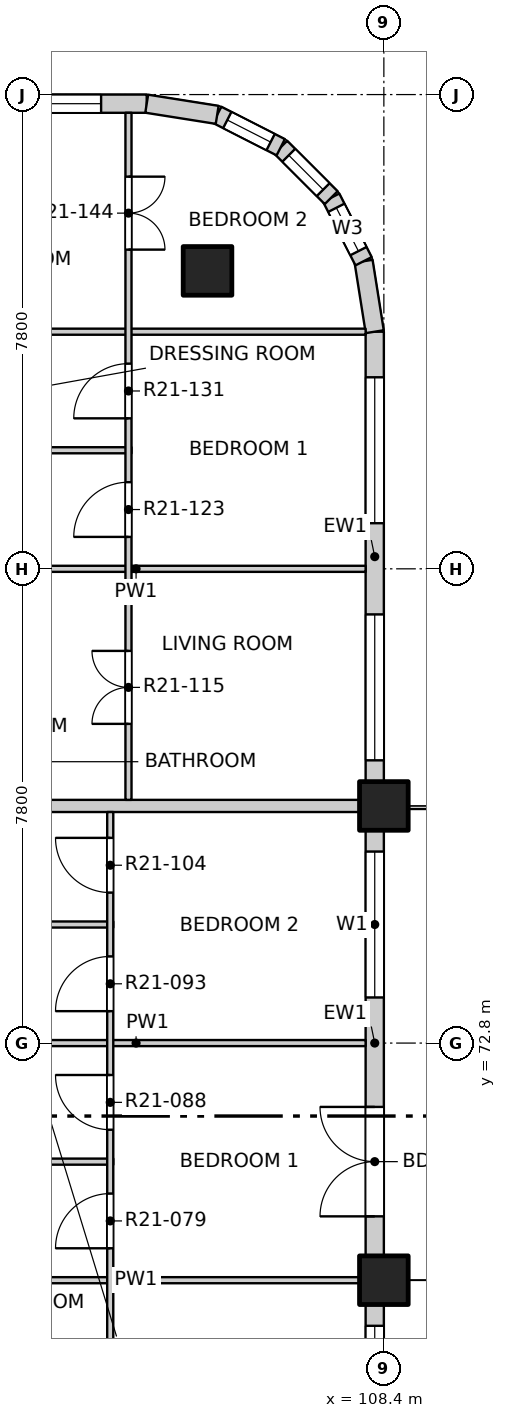
"""IFC4 building model, lengths in metres.
Left out: names, types, materials, properties, quantities, classifications, styles, units other than length and angle.
Written with IfcOpenShell. Run it as: python <this file> out.ifc"""

import sys

from ifc_helpers import new_model, si_unit, direction, frame, frame_2d, origin, origin_2d, place, context, subcontext, project, spatial, rectangle, extrude, element, fill, save


model = new_model("IFC4")
c1 = context("Model", 3, precision=1e-05, world=origin(), true_north=direction((0.0, 1.0)))
c2 = subcontext(c1, "Body", "Model", "MODEL_VIEW")
j1 = project(units=[si_unit("LENGTHUNIT", "METRE"), si_unit("PLANEANGLEUNIT", "RADIAN")], contexts=[c1])
p1 = place(None, origin())
s1 = spatial("IfcSite", under=j1, at=p1, CompositionType="ELEMENT")
p2 = place(p1, origin())
s2 = spatial("IfcBuilding", under=s1, at=p2, CompositionType="ELEMENT")
p3 = place(p2, frame((0.0, 0.0, 221.1)))
s3 = spatial("IfcBuildingStorey", under=s2, at=p3, CompositionType="ELEMENT", Elevation=221.1)
for number, where, z_axis, x_axis in (
    (1, (105.5, 85.5, -0.25), (0.0, 0.0, 1.0), (1.0, 0.0, 0.0)),
    (2, (108.4, 68.9, -0.25), (0.0, 0.0, 1.0), (1.0, 0.0, 0.0)),
    (3, (108.4, 76.7, -0.25), (0.0, 0.0, 1.0), (1.0, 0.0, 0.0)),
):
    element("IfcColumn", number, at=place(p3, frame(where, z_axis=z_axis, x_axis=x_axis)), inside=s3, PredefinedType="COLUMN", context=c2, shape_type="SweptSolid", body=[
        extrude(rectangle(XDim=0.8, YDim=0.8, at=origin_2d()), origin(), (0.0, 0.0, 1.0), 3.4),
    ])
p4 = place(p3, frame((108.25, 61.5, 0.0), z_axis=(0.0, 0.0, 1.0), x_axis=(0.0, 1.0, 0.0)))
e4 = element("IfcWall", 4, at=p4, inside=s3, PredefinedType="SOLIDWALL", context=c2, shape_type="SweptSolid", body=[
    extrude(rectangle(XDim=7.0, YDim=0.3, at=frame_2d((3.5, 0.0))), origin(), (0.0, 0.0, 1.0), 2.7),
])
p5 = place(p4, frame((0.65, 0.0, 0.0)))
e5 = element("IfcOpeningElement", 5, at=p5, cuts=e4, PredefinedType="OPENING", context=c2, shape_type="SweptSolid", body=[
    extrude(rectangle(XDim=1.8, YDim=2.4, at=frame_2d((0.9, 1.2))), frame((0.0, 0.16, 0.0), z_axis=(0.0, -1.0, 0.0), x_axis=(1.0, 0.0, 0.0)), (0.0, 0.0, 1.0), 0.32),
])
p6 = place(p4, frame((4.25, 0.0, 0.9)))
e6 = element("IfcOpeningElement", 6, at=p6, cuts=e4, PredefinedType="OPENING", context=c2, shape_type="SweptSolid", body=[
    extrude(rectangle(XDim=2.4, YDim=1.8, at=frame_2d((1.2, 0.9))), frame((0.0, 0.16, 0.0), z_axis=(0.0, -1.0, 0.0), x_axis=(1.0, 0.0, 0.0)), (0.0, 0.0, 1.0), 0.32),
])
p7 = place(p3, frame((108.25, 69.3, 0.0), z_axis=(0.0, 0.0, 1.0), x_axis=(0.0, 1.0, 0.0)))
e7 = element("IfcWall", 7, at=p7, inside=s3, PredefinedType="SOLIDWALL", context=c2, shape_type="SweptSolid", body=[
    extrude(rectangle(XDim=7.0, YDim=0.3, at=frame_2d((3.5, 0.0))), origin(), (0.0, 0.0, 1.0), 2.7),
])
p8 = place(p7, frame((0.65, 0.0, 0.0)))
e8 = element("IfcOpeningElement", 8, at=p8, cuts=e7, PredefinedType="OPENING", context=c2, shape_type="SweptSolid", body=[
    extrude(rectangle(XDim=1.8, YDim=2.4, at=frame_2d((0.9, 1.2))), frame((0.0, 0.16, 0.0), z_axis=(0.0, -1.0, 0.0), x_axis=(1.0, 0.0, 0.0)), (0.0, 0.0, 1.0), 0.32),
])
p9 = place(p7, frame((4.25, 0.0, 0.9)))
e9 = element("IfcOpeningElement", 9, at=p9, cuts=e7, PredefinedType="OPENING", context=c2, shape_type="SweptSolid", body=[
    extrude(rectangle(XDim=2.4, YDim=1.8, at=frame_2d((1.2, 0.9))), frame((0.0, 0.16, 0.0), z_axis=(0.0, -1.0, 0.0), x_axis=(1.0, 0.0, 0.0)), (0.0, 0.0, 1.0), 0.32),
])
p10 = place(p3, frame((108.25, 77.1, 0.0), z_axis=(0.0, 0.0, 1.0), x_axis=(0.0, 1.0, 0.0)))
e10 = element("IfcWall", 10, at=p10, inside=s3, PredefinedType="SOLIDWALL", context=c2, shape_type="SweptSolid", body=[
    extrude(rectangle(XDim=7.4, YDim=0.3, at=frame_2d((3.7, 0.0))), origin(), (0.0, 0.0, 1.0), 2.7),
])
p11 = place(p10, frame((0.35, 0.0, 0.9)))
e11 = element("IfcOpeningElement", 11, at=p11, cuts=e10, PredefinedType="OPENING", context=c2, shape_type="SweptSolid", body=[
    extrude(rectangle(XDim=2.4, YDim=1.8, at=frame_2d((1.2, 0.9))), frame((0.0, 0.16, 0.0), z_axis=(0.0, -1.0, 0.0), x_axis=(1.0, 0.0, 0.0)), (0.0, 0.0, 1.0), 0.32),
])
p12 = place(p10, frame((4.25, 0.0, 0.9)))
e12 = element("IfcOpeningElement", 12, at=p12, cuts=e10, PredefinedType="OPENING", context=c2, shape_type="SweptSolid", body=[
    extrude(rectangle(XDim=2.4, YDim=1.8, at=frame_2d((1.2, 0.9))), frame((0.0, 0.16, 0.0), z_axis=(0.0, -1.0, 0.0), x_axis=(1.0, 0.0, 0.0)), (0.0, 0.0, 1.0), 0.32),
])
p13 = place(p3, frame((97.1, 88.25, 0.0), z_axis=(0.0, 0.0, 1.0), x_axis=(1.0, 0.0, 0.0)))
e13 = element("IfcWall", 13, at=p13, inside=s3, PredefinedType="SOLIDWALL", context=c2, shape_type="SweptSolid", body=[
    extrude(rectangle(XDim=7.4, YDim=0.3, at=frame_2d((3.7, 0.0))), origin(), (0.0, 0.0, 1.0), 2.7),
])
p14 = place(p13, frame((0.35, 0.0, 0.9)))
e14 = element("IfcOpeningElement", 14, at=p14, cuts=e13, PredefinedType="OPENING", context=c2, shape_type="SweptSolid", body=[
    extrude(rectangle(XDim=2.4, YDim=1.8, at=frame_2d((1.2, 0.9))), frame((0.0, 0.16, 0.0), z_axis=(0.0, -1.0, 0.0), x_axis=(1.0, 0.0, 0.0)), (0.0, 0.0, 1.0), 0.32),
])
p15 = place(p13, frame((4.25, 0.0, 0.9)))
e15 = element("IfcOpeningElement", 15, at=p15, cuts=e13, PredefinedType="OPENING", context=c2, shape_type="SweptSolid", body=[
    extrude(rectangle(XDim=2.4, YDim=1.8, at=frame_2d((1.2, 0.9))), frame((0.0, 0.16, 0.0), z_axis=(0.0, -1.0, 0.0), x_axis=(1.0, 0.0, 0.0)), (0.0, 0.0, 1.0), 0.32),
])
p16 = place(p3, frame((108.25, 84.5, 0.0), z_axis=(0.0, 0.0, 1.0), x_axis=(-0.156496880861, 0.987678452879, 0.0)))
e16 = element("IfcWall", 16, at=p16, inside=s3, PredefinedType="SOLIDWALL", context=c2, shape_type="SweptSolid", body=[
    extrude(rectangle(XDim=1.173, YDim=0.3, at=frame_2d((0.586, 0.0))), origin(), (0.0, 0.0, 1.0), 2.7),
])
p17 = place(p3, frame((108.066, 85.659, 0.0), z_axis=(0.0, 0.0, 1.0), x_axis=(-0.454025524128, 0.890988677504, 0.0)))
e17 = element("IfcWall", 17, at=p17, inside=s3, PredefinedType="SOLIDWALL", context=c2, shape_type="SweptSolid", body=[
    extrude(rectangle(XDim=1.173, YDim=0.3, at=frame_2d((0.587, 0.0))), origin(), (0.0, 0.0, 1.0), 2.7),
])
p18 = place(p17, frame((0.187, 0.0, 0.9)))
e18 = element("IfcOpeningElement", 18, at=p18, cuts=e17, PredefinedType="OPENING", context=c2, shape_type="SweptSolid", body=[
    extrude(rectangle(XDim=0.8, YDim=1.2, at=frame_2d((0.4, 0.6))), frame((0.0, 0.16, 0.0), z_axis=(0.0, -1.0, 0.0), x_axis=(1.0, 0.0, 0.0)), (0.0, 0.0, 1.0), 0.32),
])
p19 = place(p3, frame((107.534, 86.704, 0.0), z_axis=(0.0, 0.0, 1.0), x_axis=(-0.707106781187, 0.707106781187, 0.0)))
e19 = element("IfcWall", 19, at=p19, inside=s3, PredefinedType="SOLIDWALL", context=c2, shape_type="SweptSolid", body=[
    extrude(rectangle(XDim=1.173, YDim=0.3, at=frame_2d((0.586, 0.0))), origin(), (0.0, 0.0, 1.0), 2.7),
])
p20 = place(p19, frame((0.187, 0.0, 0.9)))
e20 = element("IfcOpeningElement", 20, at=p20, cuts=e19, PredefinedType="OPENING", context=c2, shape_type="SweptSolid", body=[
    extrude(rectangle(XDim=0.8, YDim=1.2, at=frame_2d((0.4, 0.6))), frame((0.0, 0.16, 0.0), z_axis=(0.0, -1.0, 0.0), x_axis=(1.0, 0.0, 0.0)), (0.0, 0.0, 1.0), 0.32),
])
p21 = place(p3, frame((106.704, 87.534, 0.0), z_axis=(0.0, 0.0, 1.0), x_axis=(-0.890988677504, 0.454025524128, 0.0)))
e21 = element("IfcWall", 21, at=p21, inside=s3, PredefinedType="SOLIDWALL", context=c2, shape_type="SweptSolid", body=[
    extrude(rectangle(XDim=1.173, YDim=0.3, at=frame_2d((0.587, 0.0))), origin(), (0.0, 0.0, 1.0), 2.7),
])
p22 = place(p21, frame((0.187, 0.0, 0.9)))
e22 = element("IfcOpeningElement", 22, at=p22, cuts=e21, PredefinedType="OPENING", context=c2, shape_type="SweptSolid", body=[
    extrude(rectangle(XDim=0.8, YDim=1.2, at=frame_2d((0.4, 0.6))), frame((0.0, 0.16, 0.0), z_axis=(0.0, -1.0, 0.0), x_axis=(1.0, 0.0, 0.0)), (0.0, 0.0, 1.0), 0.32),
])
p23 = place(p3, frame((105.659, 88.066, 0.0), z_axis=(0.0, 0.0, 1.0), x_axis=(-0.987678452879, 0.156496880861, 0.0)))
e23 = element("IfcWall", 23, at=p23, inside=s3, PredefinedType="SOLIDWALL", context=c2, shape_type="SweptSolid", body=[
    extrude(rectangle(XDim=1.173, YDim=0.3, at=frame_2d((0.586, 0.0))), origin(), (0.0, 0.0, 1.0), 2.7),
])
p24 = place(p3, frame((100.55, 68.9, 0.0), z_axis=(0.0, 0.0, 1.0), x_axis=(1.0, 0.0, 0.0)))
e24 = element("IfcWall", 24, at=p24, inside=s3, PredefinedType="PARTITIONING", context=c2, shape_type="SweptSolid", body=[
    extrude(rectangle(XDim=7.55, YDim=0.1, at=frame_2d((3.775, 0.0))), origin(), (0.0, 0.0, 1.0), 2.55),
])
p25 = place(p3, frame((100.55, 70.85, 0.0), z_axis=(0.0, 0.0, 1.0), x_axis=(1.0, 0.0, 0.0)))
e25 = element("IfcWall", 25, at=p25, inside=s3, PredefinedType="PARTITIONING", context=c2, shape_type="SweptSolid", body=[
    extrude(rectangle(XDim=3.4, YDim=0.1, at=frame_2d((1.7, 0.0))), origin(), (0.0, 0.0, 1.0), 3.15),
])
p26 = place(p3, frame((100.55, 72.8, 0.0), z_axis=(0.0, 0.0, 1.0), x_axis=(1.0, 0.0, 0.0)))
e26 = element("IfcWall", 26, at=p26, inside=s3, PredefinedType="PARTITIONING", context=c2, shape_type="SweptSolid", body=[
    extrude(rectangle(XDim=7.55, YDim=0.1, at=frame_2d((3.775, 0.0))), origin(), (0.0, 0.0, 1.0), 3.15),
])
p27 = place(p3, frame((100.55, 74.75, 0.0), z_axis=(0.0, 0.0, 1.0), x_axis=(1.0, 0.0, 0.0)))
e27 = element("IfcWall", 27, at=p27, inside=s3, PredefinedType="PARTITIONING", context=c2, shape_type="SweptSolid", body=[
    extrude(rectangle(XDim=3.4, YDim=0.1, at=frame_2d((1.7, 0.0))), origin(), (0.0, 0.0, 1.0), 3.15),
])
p28 = place(p3, frame((96.6, 76.7, 0.0), z_axis=(0.0, 0.0, 1.0), x_axis=(1.0, 0.0, 0.0)))
e28 = element("IfcWall", 28, at=p28, inside=s3, PredefinedType="PARTITIONING", context=c2, shape_type="SweptSolid", body=[
    extrude(rectangle(XDim=11.5, YDim=0.2, at=frame_2d((5.75, 0.0))), origin(), (0.0, 0.0, 1.0), 2.55),
])
p29 = place(p3, frame((100.55, 80.6, 0.0), z_axis=(0.0, 0.0, 1.0), x_axis=(1.0, 0.0, 0.0)))
e29 = element("IfcWall", 29, at=p29, inside=s3, PredefinedType="PARTITIONING", context=c2, shape_type="SweptSolid", body=[
    extrude(rectangle(XDim=7.55, YDim=0.1, at=frame_2d((3.775, 0.0))), origin(), (0.0, 0.0, 1.0), 3.15),
])
p30 = place(p3, frame((100.55, 82.55, 0.0), z_axis=(0.0, 0.0, 1.0), x_axis=(1.0, 0.0, 0.0)))
e30 = element("IfcWall", 30, at=p30, inside=s3, PredefinedType="PARTITIONING", context=c2, shape_type="SweptSolid", body=[
    extrude(rectangle(XDim=3.7, YDim=0.1, at=frame_2d((1.85, 0.0))), origin(), (0.0, 0.0, 1.0), 3.15),
])
p31 = place(p3, frame((96.6, 84.5, 0.0), z_axis=(0.0, 0.0, 1.0), x_axis=(1.0, 0.0, 0.0)))
e31 = element("IfcWall", 31, at=p31, inside=s3, PredefinedType="PARTITIONING", context=c2, shape_type="SweptSolid", body=[
    extrude(rectangle(XDim=11.5, YDim=0.1, at=frame_2d((5.75, 0.0))), origin(), (0.0, 0.0, 1.0), 3.15),
])
p32 = place(p31, frame((2.635, 0.0, 0.0)))
e32 = element("IfcOpeningElement", 32, at=p32, cuts=e31, PredefinedType="OPENING", context=c2, shape_type="SweptSolid", body=[
    extrude(rectangle(XDim=0.9, YDim=2.1, at=frame_2d((0.45, 1.05))), frame((0.0, 0.06, 0.0), z_axis=(0.0, -1.0, 0.0), x_axis=(1.0, 0.0, 0.0)), (0.0, 0.0, 1.0), 0.12),
])
p33 = place(p3, frame((103.9, 65.1, 0.0), z_axis=(0.0, 0.0, 1.0), x_axis=(0.0, 1.0, 0.0)))
e33 = element("IfcWall", 33, at=p33, inside=s3, PredefinedType="PARTITIONING", context=c2, shape_type="SweptSolid", body=[
    extrude(rectangle(XDim=11.5, YDim=0.1, at=frame_2d((5.75, 0.0))), origin(), (0.0, 0.0, 1.0), 3.15),
])
p34 = place(p33, frame((1.25, 0.0, 0.0)))
e34 = element("IfcOpeningElement", 34, at=p34, cuts=e33, PredefinedType="OPENING", context=c2, shape_type="SweptSolid", body=[
    extrude(rectangle(XDim=1.2, YDim=2.1, at=frame_2d((0.6, 1.05))), frame((0.0, 0.06, 0.0), z_axis=(0.0, -1.0, 0.0), x_axis=(1.0, 0.0, 0.0)), (0.0, 0.0, 1.0), 0.12),
])
p35 = place(p33, frame((4.325, 0.0, 0.0)))
e35 = element("IfcOpeningElement", 35, at=p35, cuts=e33, PredefinedType="OPENING", context=c2, shape_type="SweptSolid", body=[
    extrude(rectangle(XDim=0.9, YDim=2.1, at=frame_2d((0.45, 1.05))), frame((0.0, 0.06, 0.0), z_axis=(0.0, -1.0, 0.0), x_axis=(1.0, 0.0, 0.0)), (0.0, 0.0, 1.0), 0.12),
])
p36 = place(p33, frame((6.275, 0.0, 0.0)))
e36 = element("IfcOpeningElement", 36, at=p36, cuts=e33, PredefinedType="OPENING", context=c2, shape_type="SweptSolid", body=[
    extrude(rectangle(XDim=0.9, YDim=2.1, at=frame_2d((0.45, 1.05))), frame((0.0, 0.06, 0.0), z_axis=(0.0, -1.0, 0.0), x_axis=(1.0, 0.0, 0.0)), (0.0, 0.0, 1.0), 0.12),
])
p37 = place(p33, frame((8.225, 0.0, 0.0)))
e37 = element("IfcOpeningElement", 37, at=p37, cuts=e33, PredefinedType="OPENING", context=c2, shape_type="SweptSolid", body=[
    extrude(rectangle(XDim=0.9, YDim=2.1, at=frame_2d((0.45, 1.05))), frame((0.0, 0.06, 0.0), z_axis=(0.0, -1.0, 0.0), x_axis=(1.0, 0.0, 0.0)), (0.0, 0.0, 1.0), 0.12),
])
p38 = place(p33, frame((10.175, 0.0, 0.0)))
e38 = element("IfcOpeningElement", 38, at=p38, cuts=e33, PredefinedType="OPENING", context=c2, shape_type="SweptSolid", body=[
    extrude(rectangle(XDim=0.9, YDim=2.1, at=frame_2d((0.45, 1.05))), frame((0.0, 0.06, 0.0), z_axis=(0.0, -1.0, 0.0), x_axis=(1.0, 0.0, 0.0)), (0.0, 0.0, 1.0), 0.12),
])
p39 = place(p3, frame((104.2, 76.8, 0.0), z_axis=(0.0, 0.0, 1.0), x_axis=(0.0, 1.0, 0.0)))
e39 = element("IfcWall", 39, at=p39, inside=s3, PredefinedType="PARTITIONING", context=c2, shape_type="SweptSolid", body=[
    extrude(rectangle(XDim=11.3, YDim=0.1, at=frame_2d((5.65, 0.0))), origin(), (0.0, 0.0, 1.0), 3.15),
])
p40 = place(p39, frame((1.25, 0.0, 0.0)))
e40 = element("IfcOpeningElement", 40, at=p40, cuts=e39, PredefinedType="OPENING", context=c2, shape_type="SweptSolid", body=[
    extrude(rectangle(XDim=1.2, YDim=2.1, at=frame_2d((0.6, 1.05))), frame((0.0, 0.06, 0.0), z_axis=(0.0, -1.0, 0.0), x_axis=(1.0, 0.0, 0.0)), (0.0, 0.0, 1.0), 0.12),
])
p41 = place(p39, frame((4.325, 0.0, 0.0)))
e41 = element("IfcOpeningElement", 41, at=p41, cuts=e39, PredefinedType="OPENING", context=c2, shape_type="SweptSolid", body=[
    extrude(rectangle(XDim=0.9, YDim=2.1, at=frame_2d((0.45, 1.05))), frame((0.0, 0.06, 0.0), z_axis=(0.0, -1.0, 0.0), x_axis=(1.0, 0.0, 0.0)), (0.0, 0.0, 1.0), 0.12),
])
p42 = place(p39, frame((6.275, 0.0, 0.0)))
e42 = element("IfcOpeningElement", 42, at=p42, cuts=e39, PredefinedType="OPENING", context=c2, shape_type="SweptSolid", body=[
    extrude(rectangle(XDim=0.9, YDim=2.1, at=frame_2d((0.45, 1.05))), frame((0.0, 0.06, 0.0), z_axis=(0.0, -1.0, 0.0), x_axis=(1.0, 0.0, 0.0)), (0.0, 0.0, 1.0), 0.12),
])
p43 = place(p39, frame((9.05, 0.0, 0.0)))
e43 = element("IfcOpeningElement", 43, at=p43, cuts=e39, PredefinedType="OPENING", context=c2, shape_type="SweptSolid", body=[
    extrude(rectangle(XDim=1.2, YDim=2.1, at=frame_2d((0.6, 1.05))), frame((0.0, 0.06, 0.0), z_axis=(0.0, -1.0, 0.0), x_axis=(1.0, 0.0, 0.0)), (0.0, 0.0, 1.0), 0.12),
])
p44 = place(p6, origin())
e44 = element("IfcWindow", 44, at=p44, inside=s3, PartitioningType="DOUBLE_PANEL_VERTICAL", PredefinedType="WINDOW", context=c2, shape_type="SweptSolid", body=[
    extrude(rectangle(XDim=2.4, YDim=1.8, at=frame_2d((1.2, 0.9))), frame((0.0, 0.03, 0.0), z_axis=(0.0, -1.0, 0.0), x_axis=(1.0, 0.0, 0.0)), (0.0, 0.0, 1.0), 0.06),
])
fill(e6, e44)
p45 = place(p8, origin())
e45 = element("IfcDoor", 45, at=p45, inside=s3, OperationType="DOUBLE_DOOR_SINGLE_SWING", PredefinedType="DOOR", context=c2, shape_type="SweptSolid", body=[
    extrude(rectangle(XDim=1.8, YDim=2.4, at=frame_2d((0.9, 1.2))), frame((0.0, 0.025, 0.0), z_axis=(0.0, -1.0, 0.0), x_axis=(1.0, 0.0, 0.0)), (0.0, 0.0, 1.0), 0.05),
])
fill(e8, e45)
p46 = place(p9, origin())
e46 = element("IfcWindow", 46, at=p46, inside=s3, PartitioningType="DOUBLE_PANEL_VERTICAL", PredefinedType="WINDOW", context=c2, shape_type="SweptSolid", body=[
    extrude(rectangle(XDim=2.4, YDim=1.8, at=frame_2d((1.2, 0.9))), frame((0.0, 0.03, 0.0), z_axis=(0.0, -1.0, 0.0), x_axis=(1.0, 0.0, 0.0)), (0.0, 0.0, 1.0), 0.06),
])
fill(e9, e46)
p47 = place(p11, origin())
e47 = element("IfcWindow", 47, at=p47, inside=s3, PartitioningType="DOUBLE_PANEL_VERTICAL", PredefinedType="WINDOW", context=c2, shape_type="SweptSolid", body=[
    extrude(rectangle(XDim=2.4, YDim=1.8, at=frame_2d((1.2, 0.9))), frame((0.0, 0.03, 0.0), z_axis=(0.0, -1.0, 0.0), x_axis=(1.0, 0.0, 0.0)), (0.0, 0.0, 1.0), 0.06),
])
fill(e11, e47)
p48 = place(p12, origin())
e48 = element("IfcWindow", 48, at=p48, inside=s3, PartitioningType="DOUBLE_PANEL_VERTICAL", PredefinedType="WINDOW", context=c2, shape_type="SweptSolid", body=[
    extrude(rectangle(XDim=2.4, YDim=1.8, at=frame_2d((1.2, 0.9))), frame((0.0, 0.03, 0.0), z_axis=(0.0, -1.0, 0.0), x_axis=(1.0, 0.0, 0.0)), (0.0, 0.0, 1.0), 0.06),
])
fill(e12, e48)
p49 = place(p15, origin())
e49 = element("IfcWindow", 49, at=p49, inside=s3, PartitioningType="DOUBLE_PANEL_VERTICAL", PredefinedType="WINDOW", context=c2, shape_type="SweptSolid", body=[
    extrude(rectangle(XDim=2.4, YDim=1.8, at=frame_2d((1.2, 0.9))), frame((0.0, 0.03, 0.0), z_axis=(0.0, -1.0, 0.0), x_axis=(1.0, 0.0, 0.0)), (0.0, 0.0, 1.0), 0.06),
])
fill(e15, e49)
p50 = place(p18, origin())
e50 = element("IfcWindow", 50, at=p50, inside=s3, PartitioningType="SINGLE_PANEL", PredefinedType="WINDOW", context=c2, shape_type="SweptSolid", body=[
    extrude(rectangle(XDim=0.8, YDim=1.2, at=frame_2d((0.4, 0.6))), frame((0.0, 0.03, 0.0), z_axis=(0.0, -1.0, 0.0), x_axis=(1.0, 0.0, 0.0)), (0.0, 0.0, 1.0), 0.06),
])
fill(e18, e50)
p51 = place(p20, origin())
e51 = element("IfcWindow", 51, at=p51, inside=s3, PartitioningType="SINGLE_PANEL", PredefinedType="WINDOW", context=c2, shape_type="SweptSolid", body=[
    extrude(rectangle(XDim=0.8, YDim=1.2, at=frame_2d((0.4, 0.6))), frame((0.0, 0.03, 0.0), z_axis=(0.0, -1.0, 0.0), x_axis=(1.0, 0.0, 0.0)), (0.0, 0.0, 1.0), 0.06),
])
fill(e20, e51)
p52 = place(p22, origin())
e52 = element("IfcWindow", 52, at=p52, inside=s3, PartitioningType="SINGLE_PANEL", PredefinedType="WINDOW", context=c2, shape_type="SweptSolid", body=[
    extrude(rectangle(XDim=0.8, YDim=1.2, at=frame_2d((0.4, 0.6))), frame((0.0, 0.03, 0.0), z_axis=(0.0, -1.0, 0.0), x_axis=(1.0, 0.0, 0.0)), (0.0, 0.0, 1.0), 0.06),
])
fill(e22, e52)
p53 = place(p35, origin())
e53 = element("IfcDoor", 53, at=p53, inside=s3, OperationType="SINGLE_SWING_LEFT", PredefinedType="DOOR", context=c2, shape_type="SweptSolid", body=[
    extrude(rectangle(XDim=0.9, YDim=2.1, at=frame_2d((0.45, 1.05))), frame((0.0, 0.025, 0.0), z_axis=(0.0, -1.0, 0.0), x_axis=(1.0, 0.0, 0.0)), (0.0, 0.0, 1.0), 0.05),
])
fill(e35, e53)
p54 = place(p36, origin())
e54 = element("IfcDoor", 54, at=p54, inside=s3, OperationType="SINGLE_SWING_RIGHT", PredefinedType="DOOR", context=c2, shape_type="SweptSolid", body=[
    extrude(rectangle(XDim=0.9, YDim=2.1, at=frame_2d((0.45, 1.05))), frame((0.0, 0.025, 0.0), z_axis=(0.0, -1.0, 0.0), x_axis=(1.0, 0.0, 0.0)), (0.0, 0.0, 1.0), 0.05),
])
fill(e36, e54)
p55 = place(p37, origin())
e55 = element("IfcDoor", 55, at=p55, inside=s3, OperationType="SINGLE_SWING_LEFT", PredefinedType="DOOR", context=c2, shape_type="SweptSolid", body=[
    extrude(rectangle(XDim=0.9, YDim=2.1, at=frame_2d((0.45, 1.05))), frame((0.0, 0.025, 0.0), z_axis=(0.0, -1.0, 0.0), x_axis=(1.0, 0.0, 0.0)), (0.0, 0.0, 1.0), 0.05),
])
fill(e37, e55)
p56 = place(p38, origin())
e56 = element("IfcDoor", 56, at=p56, inside=s3, OperationType="SINGLE_SWING_RIGHT", PredefinedType="DOOR", context=c2, shape_type="SweptSolid", body=[
    extrude(rectangle(XDim=0.9, YDim=2.1, at=frame_2d((0.45, 1.05))), frame((0.0, 0.025, 0.0), z_axis=(0.0, -1.0, 0.0), x_axis=(1.0, 0.0, 0.0)), (0.0, 0.0, 1.0), 0.05),
])
fill(e38, e56)
p57 = place(p40, origin())
e57 = element("IfcDoor", 57, at=p57, inside=s3, OperationType="DOUBLE_DOOR_SINGLE_SWING", PredefinedType="DOOR", context=c2, shape_type="SweptSolid", body=[
    extrude(rectangle(XDim=1.2, YDim=2.1, at=frame_2d((0.6, 1.05))), frame((0.0, 0.025, 0.0), z_axis=(0.0, -1.0, 0.0), x_axis=(1.0, 0.0, 0.0)), (0.0, 0.0, 1.0), 0.05),
])
fill(e40, e57)
p58 = place(p41, origin())
e58 = element("IfcDoor", 58, at=p58, inside=s3, OperationType="SINGLE_SWING_LEFT", PredefinedType="DOOR", context=c2, shape_type="SweptSolid", body=[
    extrude(rectangle(XDim=0.9, YDim=2.1, at=frame_2d((0.45, 1.05))), frame((0.0, 0.025, 0.0), z_axis=(0.0, -1.0, 0.0), x_axis=(1.0, 0.0, 0.0)), (0.0, 0.0, 1.0), 0.05),
])
fill(e41, e58)
p59 = place(p42, origin())
e59 = element("IfcDoor", 59, at=p59, inside=s3, OperationType="SINGLE_SWING_LEFT", PredefinedType="DOOR", context=c2, shape_type="SweptSolid", body=[
    extrude(rectangle(XDim=0.9, YDim=2.1, at=frame_2d((0.45, 1.05))), frame((0.0, 0.025, 0.0), z_axis=(0.0, -1.0, 0.0), x_axis=(1.0, 0.0, 0.0)), (0.0, 0.0, 1.0), 0.05),
])
fill(e42, e59)
p60 = place(p43, origin())
e60 = element("IfcDoor", 60, at=p60, inside=s3, OperationType="DOUBLE_DOOR_SINGLE_SWING", PredefinedType="DOOR", context=c2, shape_type="SweptSolid", body=[
    extrude(rectangle(XDim=1.2, YDim=2.1, at=frame_2d((0.6, 1.05))), frame((0.0, 0.025, 0.0), z_axis=(0.0, -1.0, 0.0), x_axis=(1.0, 0.0, 0.0)), (0.0, 0.0, 1.0), 0.05),
])
fill(e43, e60)
save(model, sys.argv[1])
